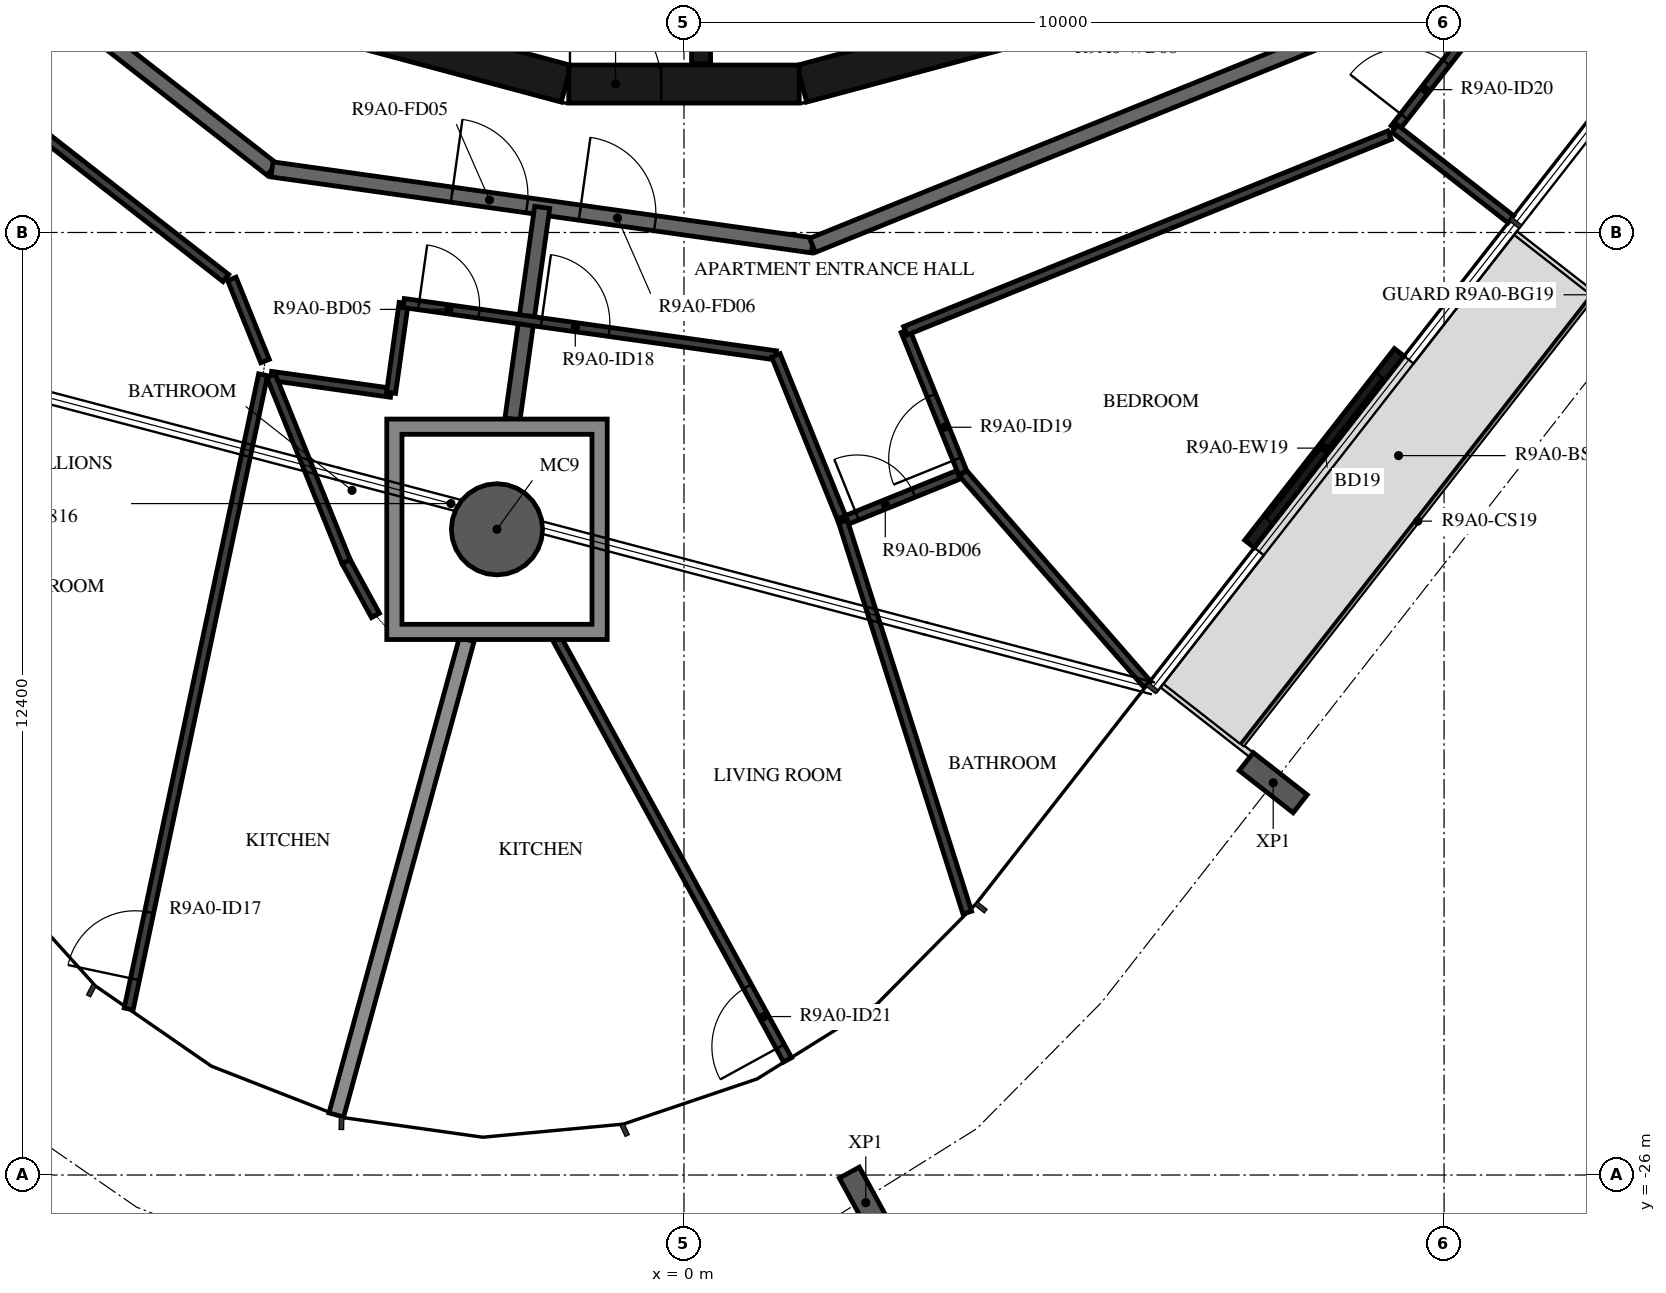
"""IFC4 building model, lengths in metres.
Left out: names, types, materials, properties, quantities, classifications, styles, units other than length and angle.
Written with IfcOpenShell. Run it as: python <this file> out.ifc"""

import sys

from ifc_helpers import new_model, si_unit, direction, frame, frame_2d, origin, origin_2d, place, context, subcontext, project, spatial, polyline, rectangle, hollow_circle, i_section, outline, extrude, element, fill, save


model = new_model("IFC4")
c1 = context("Model", 3, precision=1e-05, world=origin(), true_north=direction((0.0, 1.0)))
c2 = subcontext(c1, "Body", "Model", "MODEL_VIEW")
j1 = project(units=[si_unit("LENGTHUNIT", "METRE"), si_unit("PLANEANGLEUNIT", "RADIAN")], contexts=[c1])
p1 = place(None, origin())
s1 = spatial("IfcSite", under=j1, at=p1, CompositionType="ELEMENT")
p2 = place(p1, origin())
s2 = spatial("IfcBuilding", under=s1, at=p2, CompositionType="ELEMENT")
p3 = place(p2, frame((0.0, 0.0, 340.0)))
s3 = spatial("IfcBuildingStorey", under=s2, at=p3, CompositionType="ELEMENT", Elevation=340.0)
p4 = place(p3, frame((-2.46, -17.505, -0.38), z_axis=(0.0, 0.0, 1.0), x_axis=(1.0, 0.0, 0.0)))
e1 = element("IfcColumn", 1, at=p4, inside=s3, PredefinedType="COLUMN", context=c2, shape_type="SweptSolid", body=[
    extrude(hollow_circle(Radius=0.6, WallThickness=0.03, at=origin_2d()), origin(), (0.0, 0.0, 1.0), 3.5),
])
for number, where, z_axis, x_axis in (
    (2, (2.392, -26.363, -0.38), (0.0, 0.0, 1.0), (-0.877, -0.48, 0.0)),
    (3, (7.752, -20.839, -0.38), (0.0, 0.0, 1.0), (-0.616, -0.788, 0.0)),
):
    element("IfcColumn", number, at=place(p3, frame(where, z_axis=z_axis, x_axis=x_axis)), inside=s3, PredefinedType="COLUMN", context=c2, shape_type="SweptSolid", body=[
        extrude(i_section(OverallWidth=0.3, OverallDepth=0.9, WebThickness=0.019, FlangeThickness=0.035, FilletRadius=0.03, at=origin_2d()), origin(), (0.0, 0.0, 1.0), 3.5),
    ])
p5 = place(p3, frame((7.44, -17.698, 0.0), z_axis=(0.0, 0.0, 1.0), x_axis=(0.615666248856, 0.788007024093, 0.0)))
e4 = element("IfcWall", 4, at=p5, inside=s3, PredefinedType="STANDARD", context=c2, shape_type="SweptSolid", body=[
    extrude(rectangle(XDim=3.2, YDim=0.16, at=frame_2d((1.6, 0.0))), origin(), (0.0, 0.0, 1.0), 3.12),
])
p6 = place(p5, frame((0.4, 0.0, 0.0)))
e5 = element("IfcOpeningElement", 5, at=p6, cuts=e4, PredefinedType="OPENING", context=c2, shape_type="SweptSolid", body=[
    extrude(rectangle(XDim=2.4, YDim=2.4, at=frame_2d((1.2, 1.2))), frame((0.0, 0.09, 0.0), z_axis=(0.0, -1.0, 0.0), x_axis=(1.0, 0.0, 0.0)), (0.0, 0.0, 1.0), 0.18),
])
for number, where, z_axis, x_axis in (
    (6, (1.55, -11.643, 0.0), (0.0, 0.0, 1.0), (0.966, 0.259, 0.0)),
    (7, (-4.479, -10.858, 0.0), (0.0, 0.0, 1.0), (0.966, -0.259, 0.0)),
):
    element("IfcWall", number, at=place(p3, frame(where, z_axis=z_axis, x_axis=x_axis)), inside=s3, PredefinedType="SHEAR", context=c2, shape_type="SweptSolid", body=[
        extrude(rectangle(XDim=3.033, YDim=0.5, at=frame_2d((1.516, 0.0))), origin(), (0.0, 0.0, 1.0), 3.12),
    ])
p7 = place(p3, frame((-1.516, -11.647, 0.0), z_axis=(0.0, 0.0, 1.0), x_axis=(1.0, 0.0, 0.0)))
e8 = element("IfcWall", 8, at=p7, inside=s3, PredefinedType="SHEAR", context=c2, shape_type="SweptSolid", body=[
    extrude(rectangle(XDim=3.033, YDim=0.5, at=frame_2d((1.516, 0.0))), origin(), (0.0, 0.0, 1.0), 3.12),
])
p8 = place(p7, frame((0.016, 0.0, 0.0)))
e9 = element("IfcOpeningElement", 9, at=p8, cuts=e8, PredefinedType="OPENING", context=c2, shape_type="SweptSolid", body=[
    extrude(rectangle(XDim=1.2, YDim=2.1, at=frame_2d((0.6, 1.05))), frame((0.0, 0.26, 0.0), z_axis=(0.0, -1.0, 0.0), x_axis=(1.0, 0.0, 0.0)), (0.0, 0.0, 1.0), 0.52),
])
p9 = place(p3, frame((0.225, -8.97, 0.0), z_axis=(0.0, 0.0, 1.0), x_axis=(0.0, -1.0, 0.0)))
e10 = element("IfcWall", 10, at=p9, inside=s3, PredefinedType="SHEAR", context=c2, shape_type="SweptSolid", body=[
    extrude(rectangle(XDim=2.41, YDim=0.25, at=frame_2d((1.205, 0.0))), origin(), (0.0, 0.0, 1.0), 3.12),
])
p10 = place(p3, frame((-11.079, -8.349, 0.0), z_axis=(0.0, 0.0, 1.0), x_axis=(0.78800478687, -0.615669112324, 0.0)))
e11 = element("IfcWall", 11, at=p10, inside=s3, PredefinedType="STANDARD", context=c2, shape_type="SweptSolid", body=[
    extrude(rectangle(XDim=7.181, YDim=0.2, at=frame_2d((3.591, 0.0))), origin(), (0.0, 0.0, 1.0), 3.12),
])
p11 = place(p3, frame((-5.42, -12.77, 0.0), z_axis=(0.0, 0.0, 1.0), x_axis=(0.990270565508, -0.139155334385, 0.0)))
e12 = element("IfcWall", 12, at=p11, inside=s3, PredefinedType="STANDARD", context=c2, shape_type="SweptSolid", body=[
    extrude(rectangle(XDim=7.181, YDim=0.2, at=frame_2d((3.59, 0.0))), origin(), (0.0, 0.0, 1.0), 3.12),
])
p12 = place(p11, frame((2.39, 0.0, 0.0)))
e13 = element("IfcOpeningElement", 13, at=p12, cuts=e12, PredefinedType="OPENING", context=c2, shape_type="SweptSolid", body=[
    extrude(rectangle(XDim=1.0, YDim=2.1, at=frame_2d((0.5, 1.05))), frame((0.0, 0.11, 0.0), z_axis=(0.0, -1.0, 0.0), x_axis=(1.0, 0.0, 0.0)), (0.0, 0.0, 1.0), 0.22),
])
p13 = place(p11, frame((4.091, 0.0, 0.0)))
e14 = element("IfcOpeningElement", 14, at=p13, cuts=e12, PredefinedType="OPENING", context=c2, shape_type="SweptSolid", body=[
    extrude(rectangle(XDim=1.0, YDim=2.1, at=frame_2d((0.5, 1.05))), frame((0.0, 0.11, 0.0), z_axis=(0.0, -1.0, 0.0), x_axis=(1.0, 0.0, 0.0)), (0.0, 0.0, 1.0), 0.22),
])
p14 = place(p3, frame((1.691, -13.769, 0.0), z_axis=(0.0, 0.0, 1.0), x_axis=(0.92717916932, 0.374618189599, 0.0)))
e15 = element("IfcWall", 15, at=p14, inside=s3, PredefinedType="STANDARD", context=c2, shape_type="SweptSolid", body=[
    extrude(rectangle(XDim=7.181, YDim=0.2, at=frame_2d((3.591, 0.0))), origin(), (0.0, 0.0, 1.0), 3.12),
])
p15 = place(p3, frame((-2.256, -16.055, 0.0), z_axis=(0.0, 0.0, 1.0), x_axis=(0.139148428478, 0.990271535919, 0.0)))
e16 = element("IfcWall", 16, at=p15, inside=s3, PredefinedType="STANDARD", context=c2, shape_type="SweptSolid", body=[
    extrude(rectangle(XDim=2.812, YDim=0.2, at=frame_2d((1.406, 0.0))), origin(), (0.0, 0.0, 1.0), 3.12),
])
p16 = place(p3, frame((-4.574, -25.21, 0.0), z_axis=(0.0, 0.0, 1.0), x_axis=(0.264579024648, 0.964364007892, 0.0)))
e17 = element("IfcWall", 17, at=p16, inside=s3, PredefinedType="STANDARD", context=c2, shape_type="SweptSolid", body=[
    extrude(rectangle(XDim=6.486, YDim=0.2, at=frame_2d((3.243, 0.0))), origin(), (0.0, 0.0, 1.0), 2.73),
])
p17 = place(p3, frame((-12.319, -9.283, 0.0), z_axis=(0.0, 0.0, 1.0), x_axis=(0.788000268464, -0.61567489546, 0.0)))
e18 = element("IfcWall", 18, at=p17, inside=s3, PredefinedType="PARTITIONING", context=c2, shape_type="SweptSolid", body=[
    extrude(rectangle(XDim=7.985, YDim=0.12, at=frame_2d((3.992, 0.0))), origin(), (0.0, 0.0, 1.0), 3.12),
])
p18 = place(p17, frame((3.619, 0.0, 0.0)))
e19 = element("IfcOpeningElement", 19, at=p18, cuts=e18, PredefinedType="OPENING", context=c2, shape_type="SweptSolid", body=[
    extrude(rectangle(XDim=0.9, YDim=2.1, at=frame_2d((0.45, 1.05))), frame((0.0, 0.07, 0.0), z_axis=(0.0, -1.0, 0.0), x_axis=(1.0, 0.0, 0.0)), (0.0, 0.0, 1.0), 0.14),
])
p19 = place(p3, frame((-5.948, -14.21, 0.0), z_axis=(0.0, 0.0, 1.0), x_axis=(0.374601530156, -0.927185900241, 0.0)))
e20 = element("IfcWall", 20, at=p19, inside=s3, PredefinedType="PARTITIONING", context=c2, shape_type="SweptSolid", body=[
    extrude(rectangle(XDim=1.166, YDim=0.12, at=frame_2d((0.583, 0.0))), origin(), (0.0, 0.0, 1.0), 3.12),
])
p20 = place(p3, frame((-5.433, -15.487, 0.0), z_axis=(0.0, 0.0, 1.0), x_axis=(0.990268451053, -0.139170380644, 0.0)))
e21 = element("IfcWall", 21, at=p20, inside=s3, PredefinedType="PARTITIONING", context=c2, shape_type="SweptSolid", body=[
    extrude(rectangle(XDim=1.595, YDim=0.12, at=frame_2d((0.797, 0.0))), origin(), (0.0, 0.0, 1.0), 3.12),
])
p21 = place(p3, frame((-3.854, -15.708, 0.0), z_axis=(0.0, 0.0, 1.0), x_axis=(0.139298773474, 0.99025039849, 0.0)))
e22 = element("IfcWall", 22, at=p21, inside=s3, PredefinedType="PARTITIONING", context=c2, shape_type="SweptSolid", body=[
    extrude(rectangle(XDim=1.192, YDim=0.12, at=frame_2d((0.596, 0.0))), origin(), (0.0, 0.0, 1.0), 3.12),
])
p22 = place(p3, frame((-3.688, -14.528, 0.0), z_axis=(0.0, 0.0, 1.0), x_axis=(0.990273698817, -0.139133035013, 0.0)))
e23 = element("IfcWall", 23, at=p22, inside=s3, PredefinedType="PARTITIONING", context=c2, shape_type="SweptSolid", body=[
    extrude(rectangle(XDim=4.945, YDim=0.12, at=frame_2d((2.472, 0.0))), origin(), (0.0, 0.0, 1.0), 3.12),
])
p23 = place(p22, frame((0.2, 0.0, 0.0)))
e24 = element("IfcOpeningElement", 24, at=p23, cuts=e23, PredefinedType="OPENING", context=c2, shape_type="SweptSolid", body=[
    extrude(rectangle(XDim=0.8, YDim=2.1, at=frame_2d((0.4, 1.05))), frame((0.0, 0.07, 0.0), z_axis=(0.0, -1.0, 0.0), x_axis=(1.0, 0.0, 0.0)), (0.0, 0.0, 1.0), 0.14),
])
p24 = place(p22, frame((1.83, 0.0, 0.0)))
e25 = element("IfcOpeningElement", 25, at=p24, cuts=e23, PredefinedType="OPENING", context=c2, shape_type="SweptSolid", body=[
    extrude(rectangle(XDim=0.9, YDim=2.1, at=frame_2d((0.45, 1.05))), frame((0.0, 0.07, 0.0), z_axis=(0.0, -1.0, 0.0), x_axis=(1.0, 0.0, 0.0)), (0.0, 0.0, 1.0), 0.14),
])
p25 = place(p3, frame((-7.305, -23.815, 0.0), z_axis=(0.0, 0.0, 1.0), x_axis=(0.207366409306, 0.978263345062, 0.0)))
e26 = element("IfcWall", 26, at=p25, inside=s3, PredefinedType="PARTITIONING", context=c2, shape_type="SweptSolid", body=[
    extrude(rectangle(XDim=8.529, YDim=0.12, at=frame_2d((4.264, 0.0))), origin(), (0.0, 0.0, 1.0), 3.12),
])
p26 = place(p25, frame((0.4, 0.0, 0.0)))
e27 = element("IfcOpeningElement", 27, at=p26, cuts=e26, PredefinedType="OPENING", context=c2, shape_type="SweptSolid", body=[
    extrude(rectangle(XDim=0.9, YDim=2.1, at=frame_2d((0.45, 1.05))), frame((0.0, 0.07, 0.0), z_axis=(0.0, -1.0, 0.0), x_axis=(1.0, 0.0, 0.0)), (0.0, 0.0, 1.0), 0.14),
])
p27 = place(p3, frame((-4.059, -18.638, 0.0), z_axis=(0.0, 0.0, 1.0), x_axis=(-0.479488268542, 0.877548289458, 0.0)))
e28 = element("IfcWall", 28, at=p27, inside=s3, PredefinedType="PARTITIONING", context=c2, shape_type="SweptSolid", body=[
    extrude(rectangle(XDim=0.807, YDim=0.12, at=frame_2d((0.403, 0.0))), origin(), (0.0, 0.0, 1.0), 3.12),
])
p28 = place(p3, frame((-4.445, -17.93, 0.0), z_axis=(0.0, 0.0, 1.0), x_axis=(-0.374614676827, 0.927180588616, 0.0)))
e29 = element("IfcWall", 29, at=p28, inside=s3, PredefinedType="PARTITIONING", context=c2, shape_type="SweptSolid", body=[
    extrude(rectangle(XDim=2.635, YDim=0.12, at=frame_2d((1.318, 0.0))), origin(), (0.0, 0.0, 1.0), 3.12),
])
p29 = place(p3, frame((1.209, -15.216, 0.0), z_axis=(0.0, 0.0, 1.0), x_axis=(0.374531550488, -0.927214170345, 0.0)))
e30 = element("IfcWall", 30, at=p29, inside=s3, PredefinedType="PARTITIONING", context=c2, shape_type="SweptSolid", body=[
    extrude(rectangle(XDim=2.357, YDim=0.12, at=frame_2d((1.179, 0.0))), origin(), (0.0, 0.0, 1.0), 3.12),
])
p30 = place(p3, frame((2.092, -17.402, 0.0), z_axis=(0.0, 0.0, 1.0), x_axis=(0.927153589835, 0.374681492546, 0.0)))
e31 = element("IfcWall", 31, at=p30, inside=s3, PredefinedType="PARTITIONING", context=c2, shape_type="SweptSolid", body=[
    extrude(rectangle(XDim=1.7, YDim=0.12, at=frame_2d((0.85, 0.0))), origin(), (0.0, 0.0, 1.0), 3.12),
])
p31 = place(p30, frame((0.2, 0.0, 0.0)))
e32 = element("IfcOpeningElement", 32, at=p31, cuts=e31, PredefinedType="OPENING", context=c2, shape_type="SweptSolid", body=[
    extrude(rectangle(XDim=0.8, YDim=2.1, at=frame_2d((0.4, 1.05))), frame((0.0, 0.07, 0.0), z_axis=(0.0, -1.0, 0.0), x_axis=(1.0, 0.0, 0.0)), (0.0, 0.0, 1.0), 0.14),
])
p32 = place(p3, frame((3.668, -16.765, 0.0), z_axis=(0.0, 0.0, 1.0), x_axis=(-0.374621045498, 0.927178015416, 0.0)))
e33 = element("IfcWall", 33, at=p32, inside=s3, PredefinedType="PARTITIONING", context=c2, shape_type="SweptSolid", body=[
    extrude(rectangle(XDim=2.018, YDim=0.12, at=frame_2d((1.009, 0.0))), origin(), (0.0, 0.0, 1.0), 3.12),
])
p33 = place(p32, frame((0.2, 0.0, 0.0)))
e34 = element("IfcOpeningElement", 34, at=p33, cuts=e33, PredefinedType="OPENING", context=c2, shape_type="SweptSolid", body=[
    extrude(rectangle(XDim=0.9, YDim=2.1, at=frame_2d((0.45, 1.05))), frame((0.0, 0.07, 0.0), z_axis=(0.0, -1.0, 0.0), x_axis=(1.0, 0.0, 0.0)), (0.0, 0.0, 1.0), 0.14),
])
p34 = place(p3, frame((2.912, -14.894, 0.0), z_axis=(0.0, 0.0, 1.0), x_axis=(0.927182280165, 0.374610490174, 0.0)))
e35 = element("IfcWall", 35, at=p34, inside=s3, PredefinedType="PARTITIONING", context=c2, shape_type="SweptSolid", body=[
    extrude(rectangle(XDim=6.872, YDim=0.12, at=frame_2d((3.436, 0.0))), origin(), (0.0, 0.0, 1.0), 3.12),
])
p35 = place(p3, frame((9.351, -12.233, 0.0), z_axis=(0.0, 0.0, 1.0), x_axis=(0.615678207218, 0.787997680933, 0.0)))
e36 = element("IfcWall", 36, at=p35, inside=s3, PredefinedType="PARTITIONING", context=c2, shape_type="SweptSolid", body=[
    extrude(rectangle(XDim=7.765, YDim=0.12, at=frame_2d((3.883, 0.0))), origin(), (0.0, 0.0, 1.0), 3.12),
])
p36 = place(p35, frame((0.2, 0.0, 0.0)))
e37 = element("IfcOpeningElement", 37, at=p36, cuts=e36, PredefinedType="OPENING", context=c2, shape_type="SweptSolid", body=[
    extrude(rectangle(XDim=0.9, YDim=2.1, at=frame_2d((0.45, 1.05))), frame((0.0, 0.07, 0.0), z_axis=(0.0, -1.0, 0.0), x_axis=(1.0, 0.0, 0.0)), (0.0, 0.0, 1.0), 0.14),
])
p37 = place(p3, frame((1.363, -24.485, 0.0), z_axis=(0.0, 0.0, 1.0), x_axis=(-0.480397592444, 0.877050827018, 0.0)))
e38 = element("IfcWall", 38, at=p37, inside=s3, PredefinedType="PARTITIONING", context=c2, shape_type="SweptSolid", body=[
    extrude(rectangle(XDim=6.306, YDim=0.12, at=frame_2d((3.153, 0.0))), origin(), (0.0, 0.0, 1.0), 2.73),
])
p38 = place(p37, frame((0.2, 0.0, 0.0)))
e39 = element("IfcOpeningElement", 39, at=p38, cuts=e38, PredefinedType="OPENING", context=c2, shape_type="SweptSolid", body=[
    extrude(rectangle(XDim=0.9, YDim=2.1, at=frame_2d((0.45, 1.05))), frame((0.0, 0.07, 0.0), z_axis=(0.0, -1.0, 0.0), x_axis=(1.0, 0.0, 0.0)), (0.0, 0.0, 1.0), 0.14),
])
p39 = place(p3, frame((3.728, -22.548, 0.0), z_axis=(0.0, 0.0, 1.0), x_axis=(-0.302890110312, 0.953025488156, 0.0)))
e40 = element("IfcWall", 40, at=p39, inside=s3, PredefinedType="PARTITIONING", context=c2, shape_type="SweptSolid", body=[
    extrude(rectangle(XDim=5.4, YDim=0.12, at=frame_2d((2.7, 0.0))), origin(), (0.0, 0.0, 1.0), 3.12),
])
p40 = place(p3, frame((6.097, -19.546, 0.0), z_axis=(0.0, 0.0, 1.0), x_axis=(-0.657863093444, 0.753137537429, 0.0)))
e41 = element("IfcWall", 41, at=p40, inside=s3, PredefinedType="PARTITIONING", context=c2, shape_type="SweptSolid", body=[
    extrude(rectangle(XDim=3.693, YDim=0.12, at=frame_2d((1.846, 0.0))), origin(), (0.0, 0.0, 1.0), 2.73),
])
p41 = place(p3, frame((10.878, -13.427, 0.0), z_axis=(0.0, 0.0, 1.0), x_axis=(-0.787980458379, 0.615700249483, 0.0)))
e42 = element("IfcWall", 42, at=p41, inside=s3, PredefinedType="PARTITIONING", context=c2, shape_type="SweptSolid", body=[
    extrude(rectangle(XDim=1.939, YDim=0.12, at=frame_2d((0.969, 0.0))), origin(), (0.0, 0.0, 1.0), 2.73),
])
p42 = place(p3, origin())
e43 = element("IfcWall", 43, at=p42, inside=s3, PredefinedType="STANDARD", context=c2, shape_type="SweptSolid", body=[
    extrude(outline(polyline([(-1.01, -16.055), (-1.01, -18.955), (-3.91, -18.955), (-3.91, -16.055), (-1.01, -16.055)]), holes=[polyline([(-3.71, -18.755), (-1.21, -18.755), (-1.21, -16.255), (-3.71, -16.255), (-3.71, -18.755)])]), origin(), (0.0, 0.0, 1.0), 3.12),
])
p43 = place(p6, origin())
e44 = element("IfcDoor", 44, at=p43, inside=s3, OperationType="DOUBLE_DOOR_SLIDING", PredefinedType="DOOR", context=c2, shape_type="SweptSolid", body=[
    extrude(rectangle(XDim=2.4, YDim=2.4, at=frame_2d((1.2, 1.2))), frame((0.0, 0.025, 0.0), z_axis=(0.0, -1.0, 0.0), x_axis=(1.0, 0.0, 0.0)), (0.0, 0.0, 1.0), 0.05),
])
fill(e5, e44)
p44 = place(p8, origin())
e45 = element("IfcDoor", 45, at=p44, inside=s3, OperationType="SINGLE_SWING_RIGHT", PredefinedType="DOOR", context=c2, shape_type="SweptSolid", body=[
    extrude(rectangle(XDim=1.2, YDim=2.1, at=frame_2d((0.6, 1.05))), frame((0.0, 0.025, 0.0), z_axis=(0.0, -1.0, 0.0), x_axis=(1.0, 0.0, 0.0)), (0.0, 0.0, 1.0), 0.05),
])
fill(e9, e45)
p45 = place(p12, origin())
e46 = element("IfcDoor", 46, at=p45, inside=s3, OperationType="SINGLE_SWING_RIGHT", PredefinedType="DOOR", context=c2, shape_type="SweptSolid", body=[
    extrude(rectangle(XDim=1.0, YDim=2.1, at=frame_2d((0.5, 1.05))), frame((0.0, 0.025, 0.0), z_axis=(0.0, -1.0, 0.0), x_axis=(1.0, 0.0, 0.0)), (0.0, 0.0, 1.0), 0.05),
])
fill(e13, e46)
p46 = place(p23, origin())
e47 = element("IfcDoor", 47, at=p46, inside=s3, OperationType="SINGLE_SWING_RIGHT", PredefinedType="DOOR", context=c2, shape_type="SweptSolid", body=[
    extrude(rectangle(XDim=0.8, YDim=2.1, at=frame_2d((0.4, 1.05))), frame((0.0, 0.025, 0.0), z_axis=(0.0, -1.0, 0.0), x_axis=(1.0, 0.0, 0.0)), (0.0, 0.0, 1.0), 0.05),
])
fill(e24, e47)
p47 = place(p26, origin())
e48 = element("IfcDoor", 48, at=p47, inside=s3, OperationType="SINGLE_SWING_RIGHT", PredefinedType="DOOR", context=c2, shape_type="SweptSolid", body=[
    extrude(rectangle(XDim=0.9, YDim=2.1, at=frame_2d((0.45, 1.05))), frame((0.0, 0.025, 0.0), z_axis=(0.0, -1.0, 0.0), x_axis=(1.0, 0.0, 0.0)), (0.0, 0.0, 1.0), 0.05),
])
fill(e27, e48)
p48 = place(p13, origin())
e49 = element("IfcDoor", 49, at=p48, inside=s3, OperationType="SINGLE_SWING_RIGHT", PredefinedType="DOOR", context=c2, shape_type="SweptSolid", body=[
    extrude(rectangle(XDim=1.0, YDim=2.1, at=frame_2d((0.5, 1.05))), frame((0.0, 0.025, 0.0), z_axis=(0.0, -1.0, 0.0), x_axis=(1.0, 0.0, 0.0)), (0.0, 0.0, 1.0), 0.05),
])
fill(e14, e49)
p49 = place(p24, origin())
e50 = element("IfcDoor", 50, at=p49, inside=s3, OperationType="SINGLE_SWING_RIGHT", PredefinedType="DOOR", context=c2, shape_type="SweptSolid", body=[
    extrude(rectangle(XDim=0.9, YDim=2.1, at=frame_2d((0.45, 1.05))), frame((0.0, 0.025, 0.0), z_axis=(0.0, -1.0, 0.0), x_axis=(1.0, 0.0, 0.0)), (0.0, 0.0, 1.0), 0.05),
])
fill(e25, e50)
p50 = place(p31, origin())
e51 = element("IfcDoor", 51, at=p50, inside=s3, OperationType="SINGLE_SWING_LEFT", PredefinedType="DOOR", context=c2, shape_type="SweptSolid", body=[
    extrude(rectangle(XDim=0.8, YDim=2.1, at=frame_2d((0.4, 1.05))), frame((0.0, 0.025, 0.0), z_axis=(0.0, -1.0, 0.0), x_axis=(1.0, 0.0, 0.0)), (0.0, 0.0, 1.0), 0.05),
])
fill(e32, e51)
p51 = place(p33, origin())
e52 = element("IfcDoor", 52, at=p51, inside=s3, OperationType="SINGLE_SWING_RIGHT", PredefinedType="DOOR", context=c2, shape_type="SweptSolid", body=[
    extrude(rectangle(XDim=0.9, YDim=2.1, at=frame_2d((0.45, 1.05))), frame((0.0, 0.025, 0.0), z_axis=(0.0, -1.0, 0.0), x_axis=(1.0, 0.0, 0.0)), (0.0, 0.0, 1.0), 0.05),
])
fill(e34, e52)
p52 = place(p36, origin())
e53 = element("IfcDoor", 53, at=p52, inside=s3, OperationType="SINGLE_SWING_LEFT", PredefinedType="DOOR", context=c2, shape_type="SweptSolid", body=[
    extrude(rectangle(XDim=0.9, YDim=2.1, at=frame_2d((0.45, 1.05))), frame((0.0, 0.025, 0.0), z_axis=(0.0, -1.0, 0.0), x_axis=(1.0, 0.0, 0.0)), (0.0, 0.0, 1.0), 0.05),
])
fill(e37, e53)
p53 = place(p38, origin())
e54 = element("IfcDoor", 54, at=p53, inside=s3, OperationType="SINGLE_SWING_LEFT", PredefinedType="DOOR", context=c2, shape_type="SweptSolid", body=[
    extrude(rectangle(XDim=0.9, YDim=2.1, at=frame_2d((0.45, 1.05))), frame((0.0, 0.025, 0.0), z_axis=(0.0, -1.0, 0.0), x_axis=(1.0, 0.0, 0.0)), (0.0, 0.0, 1.0), 0.05),
])
fill(e39, e54)
save(model, sys.argv[1])
